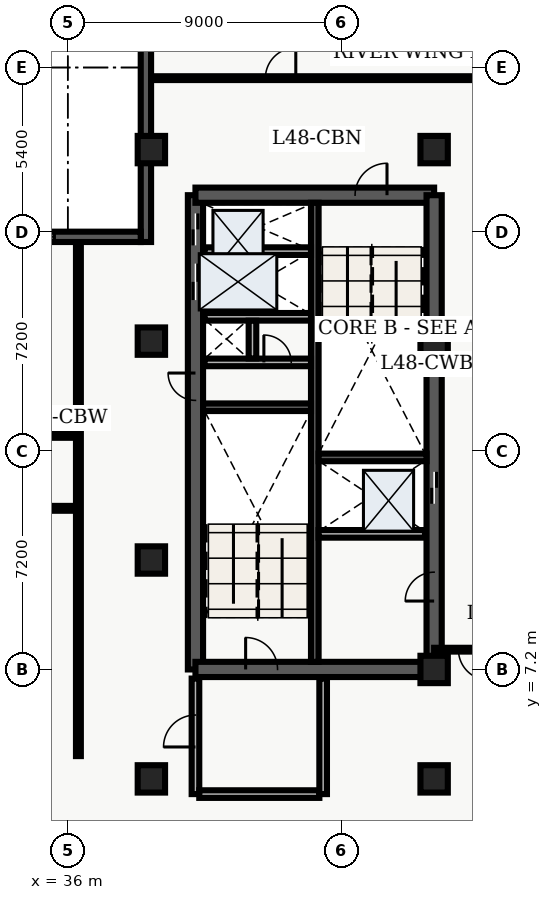
"""IFC4 building model, lengths in metres.
Left out: names, types, materials, properties, quantities, classifications, styles, units other than length and angle.
Written with IfcOpenShell. Run it as: python <this file> out.ifc"""

import sys

from ifc_helpers import new_model, entity, si_unit, converted_unit, direction, frame, origin_with_axes, origin_2d_with_axis, place, context, subcontext, project, spatial, polyline, rectangle, outline, extrude, element, fill, save


model = new_model("IFC4")
c1 = context("Model", 3, precision=1e-05, world=origin_with_axes(), true_north=direction((0.0, 1.0)))
c2 = subcontext(c1, "Body", "Model", "MODEL_VIEW")
j1 = project(units=[si_unit("LENGTHUNIT", "METRE"), converted_unit("PLANEANGLEUNIT", "DEGREE", entity("IfcPlaneAngleMeasure", 0.017), si_unit("PLANEANGLEUNIT", "RADIAN"), dimensions=[0, 0, 0, 0, 0, 0, 0])], contexts=[c1])
p1 = place(None, origin_with_axes())
s1 = spatial("IfcSite", under=j1, at=p1, CompositionType="ELEMENT")
p2 = place(p1, origin_with_axes())
s2 = spatial("IfcBuilding", under=s1, at=p2, CompositionType="ELEMENT")
p3 = place(p2, frame((0.0, 0.0, 196.5), z_axis=(0.0, 0.0, 1.0), x_axis=(1.0, 0.0, 0.0)))
s3 = spatial("IfcBuildingStorey", under=s2, at=p3, CompositionType="ELEMENT", Elevation=196.5)
p4 = place(p3, frame((40.2, 7.2, 0.0), z_axis=(0.0, 0.0, 1.0), x_axis=(0.0, 1.0, 0.0)))
e1 = element("IfcWall", 1, at=p4, inside=s3, PredefinedType="SHEAR", context=c2, shape_type="SweptSolid", body=[
    extrude(outline(polyline([(0.0, -0.25), (15.6, -0.25), (15.6, 0.25), (0.0, 0.25), (0.0, -0.25)])), origin_with_axes(), (0.0, 0.0, 1.0), 3.66),
])
p5 = place(p4, frame((14.475, 0.0, 0.0), z_axis=(0.0, 0.0, 1.0), x_axis=(1.0, 0.0, 0.0)))
e2 = element("IfcOpeningElement", 2, at=p5, cuts=e1, PredefinedType="OPENING", context=c2, shape_type="SweptSolid", body=[
    extrude(rectangle(XDim=1.05, YDim=0.52, at=origin_2d_with_axis()), origin_with_axes(), (0.0, 0.0, 1.0), 2.15),
])
p6 = place(p4, frame((12.75, 0.0, 0.0), z_axis=(0.0, 0.0, 1.0), x_axis=(1.0, 0.0, 0.0)))
e3 = element("IfcOpeningElement", 3, at=p6, cuts=e1, PredefinedType="OPENING", context=c2, shape_type="SweptSolid", body=[
    extrude(rectangle(XDim=1.2, YDim=0.52, at=origin_2d_with_axis()), origin_with_axes(), (0.0, 0.0, 1.0), 2.15),
])
p7 = place(p4, frame((9.3, 0.0, 0.0), z_axis=(0.0, 0.0, 1.0), x_axis=(1.0, 0.0, 0.0)))
e4 = element("IfcOpeningElement", 4, at=p7, cuts=e1, PredefinedType="OPENING", context=c2, shape_type="SweptSolid", body=[
    extrude(rectangle(XDim=0.9, YDim=0.52, at=origin_2d_with_axis()), origin_with_axes(), (0.0, 0.0, 1.0), 2.15),
])
p8 = place(p3, frame((40.2, 7.2, 0.0), z_axis=(0.0, 0.0, 1.0), x_axis=(1.0, 0.0, 0.0)))
e5 = element("IfcWall", 5, at=p8, inside=s3, PredefinedType="SHEAR", context=c2, shape_type="SweptSolid", body=[
    extrude(outline(polyline([(0.0, -0.25), (7.85, -0.25), (7.85, 0.25), (0.0, 0.25), (0.0, -0.25)])), origin_with_axes(), (0.0, 0.0, 1.0), 3.66),
])
p9 = place(p8, frame((2.175, 0.0, 0.0), z_axis=(0.0, 0.0, 1.0), x_axis=(1.0, 0.0, 0.0)))
e6 = element("IfcOpeningElement", 6, at=p9, cuts=e5, PredefinedType="OPENING", context=c2, shape_type="SweptSolid", body=[
    extrude(rectangle(XDim=1.05, YDim=0.52, at=origin_2d_with_axis()), origin_with_axes(), (0.0, 0.0, 1.0), 2.15),
])
p10 = place(p3, frame((40.2, 22.8, 0.0), z_axis=(0.0, 0.0, 1.0), x_axis=(1.0, 0.0, 0.0)))
e7 = element("IfcWall", 7, at=p10, inside=s3, PredefinedType="SHEAR", context=c2, shape_type="SweptSolid", body=[
    extrude(outline(polyline([(0.0, -0.25), (7.85, -0.25), (7.85, 0.25), (0.0, 0.25), (0.0, -0.25)])), origin_with_axes(), (0.0, 0.0, 1.0), 3.66),
])
p11 = place(p10, frame((5.775, 0.0, 0.0), z_axis=(0.0, 0.0, 1.0), x_axis=(1.0, 0.0, 0.0)))
e8 = element("IfcOpeningElement", 8, at=p11, cuts=e7, PredefinedType="OPENING", context=c2, shape_type="SweptSolid", body=[
    extrude(rectangle(XDim=1.05, YDim=0.52, at=origin_2d_with_axis()), origin_with_axes(), (0.0, 0.0, 1.0), 2.15),
])
p12 = place(p3, frame((48.05, 7.2, 0.0), z_axis=(0.0, 0.0, 1.0), x_axis=(0.0, 1.0, 0.0)))
e9 = element("IfcWall", 9, at=p12, inside=s3, PredefinedType="SHEAR", context=c2, shape_type="SweptSolid", body=[
    extrude(outline(polyline([(0.0, -0.25), (15.6, -0.25), (15.6, 0.25), (0.0, 0.25), (0.0, -0.25)])), origin_with_axes(), (0.0, 0.0, 1.0), 3.66),
])
p13 = place(p12, frame((5.975, 0.0, 0.0), z_axis=(0.0, 0.0, 1.0), x_axis=(1.0, 0.0, 0.0)))
e10 = element("IfcOpeningElement", 10, at=p13, cuts=e9, PredefinedType="OPENING", context=c2, shape_type="SweptSolid", body=[
    extrude(rectangle(XDim=1.05, YDim=0.52, at=origin_2d_with_axis()), origin_with_axes(), (0.0, 0.0, 1.0), 2.15),
])
p14 = place(p12, frame((2.725, 0.0, 0.0), z_axis=(0.0, 0.0, 1.0), x_axis=(1.0, 0.0, 0.0)))
e11 = element("IfcOpeningElement", 11, at=p14, cuts=e9, PredefinedType="OPENING", context=c2, shape_type="SweptSolid", body=[
    extrude(rectangle(XDim=0.95, YDim=0.52, at=origin_2d_with_axis()), origin_with_axes(), (0.0, 0.0, 1.0), 2.15),
])
p15 = place(p3, frame((44.125, 7.45, 0.0), z_axis=(0.0, 0.0, 1.0), x_axis=(0.0, 1.0, 0.0)))
e12 = element("IfcWall", 12, at=p15, inside=s3, PredefinedType="SHEAR", context=c2, shape_type="SweptSolid", body=[
    extrude(outline(polyline([(0.0, -0.125), (15.1, -0.125), (15.1, 0.125), (0.0, 0.125), (0.0, -0.125)])), origin_with_axes(), (0.0, 0.0, 1.0), 3.66),
])
for number, where, z_axis, x_axis in (
    (13, (40.45, 15.825, 0.0), (0.0, 0.0, 1.0), (1.0, 0.0, 0.0)),
    (14, (44.25, 14.175, 0.0), (0.0, 0.0, 1.0), (1.0, 0.0, 0.0)),
):
    element("IfcWall", number, at=place(p3, frame(where, z_axis=z_axis, x_axis=x_axis)), inside=s3, PredefinedType="SHEAR", context=c2, shape_type="SweptSolid", body=[
        extrude(outline(polyline([(0.0, -0.125), (3.55, -0.125), (3.55, 0.125), (0.0, 0.125), (0.0, -0.125)])), origin_with_axes(), (0.0, 0.0, 1.0), 3.66),
    ])
p16 = place(p3, frame((40.5, 17.3, 0.0), z_axis=(0.0, 0.0, 1.0), x_axis=(1.0, 0.0, 0.0)))
e15 = element("IfcWall", 15, at=p16, inside=s3, PredefinedType="SOLIDWALL", context=c2, shape_type="SweptSolid", body=[
    extrude(outline(polyline([(0.0, -0.125), (3.5, -0.125), (3.5, 0.125), (0.0, 0.125), (0.0, -0.125)])), origin_with_axes(), (0.0, 0.0, 1.0), 2.7),
])
p17 = place(p16, frame((2.4, 0.0, 0.0), z_axis=(0.0, 0.0, 1.0), x_axis=(1.0, 0.0, 0.0)))
e16 = element("IfcOpeningElement", 16, at=p17, cuts=e15, PredefinedType="OPENING", context=c2, shape_type="SweptSolid", body=[
    extrude(rectangle(XDim=0.9, YDim=0.27, at=origin_2d_with_axis()), origin_with_axes(), (0.0, 0.0, 1.0), 2.15),
])
p18 = place(p3, frame((40.5, 18.8, 0.0), z_axis=(0.0, 0.0, 1.0), x_axis=(1.0, 0.0, 0.0)))
e17 = element("IfcWall", 17, at=p18, inside=s3, PredefinedType="SOLIDWALL", context=c2, shape_type="SweptSolid", body=[
    extrude(outline(polyline([(0.0, -0.125), (3.5, -0.125), (3.5, 0.125), (0.0, 0.125), (0.0, -0.125)])), origin_with_axes(), (0.0, 0.0, 1.0), 2.7),
])
p19 = place(p3, frame((42.075, 17.43, 0.0), z_axis=(0.0, 0.0, 1.0), x_axis=(0.0, 1.0, 0.0)))
e18 = element("IfcWall", 18, at=p19, inside=s3, PredefinedType="SOLIDWALL", context=c2, shape_type="SweptSolid", body=[
    extrude(outline(polyline([(0.0, -0.125), (1.24, -0.125), (1.24, 0.125), (0.0, 0.125), (0.0, -0.125)])), origin_with_axes(), (0.0, 0.0, 1.0), 2.7),
])
p20 = place(p3, frame((40.2, 3.1, 0.0), z_axis=(0.0, 0.0, 1.0), x_axis=(0.0, 1.0, 0.0)))
e19 = element("IfcWall", 19, at=p20, inside=s3, PredefinedType="SOLIDWALL", context=c2, shape_type="SweptSolid", body=[
    extrude(outline(polyline([(0.0, -0.125), (3.8, -0.125), (3.8, 0.125), (0.0, 0.125), (0.0, -0.125)])), origin_with_axes(), (0.0, 0.0, 1.0), 2.7),
])
p21 = place(p20, frame((2.075, 0.0, 0.0), z_axis=(0.0, 0.0, 1.0), x_axis=(1.0, 0.0, 0.0)))
e20 = element("IfcOpeningElement", 20, at=p21, cuts=e19, PredefinedType="OPENING", context=c2, shape_type="SweptSolid", body=[
    extrude(rectangle(XDim=1.05, YDim=0.27, at=origin_2d_with_axis()), origin_with_axes(), (0.0, 0.0, 1.0), 2.15),
])
p22 = place(p3, frame((40.325, 3.1, 0.0), z_axis=(0.0, 0.0, 1.0), x_axis=(1.0, 0.0, 0.0)))
e21 = element("IfcWall", 21, at=p22, inside=s3, PredefinedType="SOLIDWALL", context=c2, shape_type="SweptSolid", body=[
    extrude(outline(polyline([(0.0, -0.125), (3.95, -0.125), (3.95, 0.125), (0.0, 0.125), (0.0, -0.125)])), origin_with_axes(), (0.0, 0.0, 1.0), 2.7),
])
p23 = place(p3, frame((44.4, 3.1, 0.0), z_axis=(0.0, 0.0, 1.0), x_axis=(0.0, 1.0, 0.0)))
e22 = element("IfcWall", 22, at=p23, inside=s3, PredefinedType="SOLIDWALL", context=c2, shape_type="SweptSolid", body=[
    extrude(outline(polyline([(0.0, -0.125), (3.8, -0.125), (3.8, 0.125), (0.0, 0.125), (0.0, -0.125)])), origin_with_axes(), (0.0, 0.0, 1.0), 2.7),
])
for number, where, z_axis, x_axis in (
    (23, (38.75, 3.6, 0.0), (0.0, 0.0, 1.0), (1.0, 0.0, 0.0)),
    (24, (38.75, 10.8, 0.0), (0.0, 0.0, 1.0), (1.0, 0.0, 0.0)),
    (25, (38.75, 18.0, 0.0), (0.0, 0.0, 1.0), (1.0, 0.0, 0.0)),
    (26, (38.75, 24.3, 0.0), (0.0, 0.0, 1.0), (1.0, 0.0, 0.0)),
    (27, (48.05, 3.6, 0.0), (0.0, 0.0, 1.0), (1.0, 0.0, 0.0)),
    (28, (48.05, 7.2, 0.0), (0.0, 0.0, 1.0), (1.0, 0.0, 0.0)),
    (29, (48.05, 18.0, 0.0), (0.0, 0.0, 1.0), (1.0, 0.0, 0.0)),
    (30, (48.05, 24.3, 0.0), (0.0, 0.0, 1.0), (1.0, 0.0, 0.0)),
):
    element("IfcColumn", number, at=place(p3, frame(where, z_axis=z_axis, x_axis=x_axis)), inside=s3, PredefinedType="COLUMN", context=c2, shape_type="SweptSolid", body=[
        extrude(rectangle(XDim=0.9, YDim=0.9, at=origin_2d_with_axis()), origin_with_axes(), (0.0, 0.0, 1.0), 3.9),
    ])
for number, where, z_axis, x_axis in (
    (31, (40.5, 20.96, 0.0), (0.0, 0.0, 1.0), (1.0, 0.0, 0.0)),
    (32, (44.25, 11.66, 0.0), (0.0, 0.0, 1.0), (1.0, 0.0, 0.0)),
):
    element("IfcWall", number, at=place(p3, frame(where, z_axis=z_axis, x_axis=x_axis)), inside=s3, PredefinedType="SOLIDWALL", context=c2, shape_type="SweptSolid", body=[
        extrude(outline(polyline([(0.0, -0.125), (3.5, -0.125), (3.5, 0.125), (0.0, 0.125), (0.0, -0.125)])), origin_with_axes(), (0.0, 0.0, 1.0), 2.7),
    ])
p24 = place(p3, frame((21.15, 12.5, 0.0), z_axis=(0.0, 0.0, 1.0), x_axis=(1.0, 0.0, 0.0)))
e33 = element("IfcWall", 33, at=p24, inside=s3, PredefinedType="PARTITIONING", context=c2, shape_type="SweptSolid", body=[
    extrude(outline(polyline([(0.0, -0.08), (15.2, -0.08), (15.2, 0.08), (0.0, 0.08), (0.0, -0.08)])), origin_with_axes(), (0.0, 0.0, 1.0), 2.7),
])
p25 = place(p24, frame((3.315, 0.0, 0.0), z_axis=(0.0, 0.0, 1.0), x_axis=(1.0, 0.0, 0.0)))
e34 = element("IfcOpeningElement", 34, at=p25, cuts=e33, PredefinedType="OPENING", context=c2, shape_type="SweptSolid", body=[
    extrude(rectangle(XDim=1.0, YDim=0.18, at=origin_2d_with_axis()), origin_with_axes(), (0.0, 0.0, 1.0), 2.15),
])
p26 = place(p24, frame((7.639, 0.0, 0.0), z_axis=(0.0, 0.0, 1.0), x_axis=(1.0, 0.0, 0.0)))
e35 = element("IfcOpeningElement", 35, at=p26, cuts=e33, PredefinedType="OPENING", context=c2, shape_type="SweptSolid", body=[
    extrude(rectangle(XDim=1.0, YDim=0.18, at=origin_2d_with_axis()), origin_with_axes(), (0.0, 0.0, 1.0), 2.15),
])
p27 = place(p24, frame((10.313, 0.0, 0.0), z_axis=(0.0, 0.0, 1.0), x_axis=(1.0, 0.0, 0.0)))
e36 = element("IfcOpeningElement", 36, at=p27, cuts=e33, PredefinedType="OPENING", context=c2, shape_type="SweptSolid", body=[
    extrude(rectangle(XDim=1.0, YDim=0.18, at=origin_2d_with_axis()), origin_with_axes(), (0.0, 0.0, 1.0), 2.15),
])
p28 = place(p24, frame((13.179, 0.0, 0.0), z_axis=(0.0, 0.0, 1.0), x_axis=(1.0, 0.0, 0.0)))
e37 = element("IfcOpeningElement", 37, at=p28, cuts=e33, PredefinedType="OPENING", context=c2, shape_type="SweptSolid", body=[
    extrude(rectangle(XDim=1.0, YDim=0.18, at=origin_2d_with_axis()), origin_with_axes(), (0.0, 0.0, 1.0), 2.15),
])
p29 = place(p3, frame((21.15, 14.9, 0.0), z_axis=(0.0, 0.0, 1.0), x_axis=(1.0, 0.0, 0.0)))
e38 = element("IfcWall", 38, at=p29, inside=s3, PredefinedType="PARTITIONING", context=c2, shape_type="SweptSolid", body=[
    extrude(outline(polyline([(0.0, -0.08), (15.2, -0.08), (15.2, 0.08), (0.0, 0.08), (0.0, -0.08)])), origin_with_axes(), (0.0, 0.0, 1.0), 2.7),
])
p30 = place(p29, frame((7.65, 0.0, 0.0), z_axis=(0.0, 0.0, 1.0), x_axis=(1.0, 0.0, 0.0)))
e39 = element("IfcOpeningElement", 39, at=p30, cuts=e38, PredefinedType="OPENING", context=c2, shape_type="SweptSolid", body=[
    extrude(rectangle(XDim=1.2, YDim=0.18, at=origin_2d_with_axis()), origin_with_axes(), (0.0, 0.0, 1.0), 2.2),
])
p31 = place(p3, frame((36.35, 4.35, 0.0), z_axis=(0.0, 0.0, 1.0), x_axis=(0.0, 1.0, 0.0)))
e40 = element("IfcWall", 40, at=p31, inside=s3, PredefinedType="PARTITIONING", context=c2, shape_type="SweptSolid", body=[
    extrude(outline(polyline([(0.0, -0.08), (16.95, -0.08), (16.95, 0.08), (0.0, 0.08), (0.0, -0.08)])), origin_with_axes(), (0.0, 0.0, 1.0), 2.7),
])
p32 = place(p3, frame((59.665, 7.85, 0.0), z_axis=(0.0, 0.0, 1.0), x_axis=(-1.0, 0.0, 0.0)))
e41 = element("IfcWall", 41, at=p32, inside=s3, PredefinedType="PARTITIONING", context=c2, shape_type="SweptSolid", body=[
    extrude(outline(polyline([(0.0, -0.062), (11.615, -0.062), (11.615, 0.062), (0.0, 0.062), (0.0, -0.062)])), origin_with_axes(), (0.0, 0.0, 1.0), 2.7),
])
p33 = place(p32, frame((10.315, 0.0, 0.0), z_axis=(0.0, 0.0, 1.0), x_axis=(1.0, 0.0, 0.0)))
e42 = element("IfcOpeningElement", 42, at=p33, cuts=e41, PredefinedType="OPENING", context=c2, shape_type="SweptSolid", body=[
    extrude(rectangle(XDim=1.0, YDim=0.145, at=origin_2d_with_axis()), origin_with_axes(), (0.0, 0.0, 1.0), 2.15),
])
p34 = place(p3, frame((38.735, 26.65, 0.0), z_axis=(0.0, 0.0, 1.0), x_axis=(1.0, 0.0, 0.0)))
e43 = element("IfcWall", 43, at=p34, inside=s3, PredefinedType="PARTITIONING", context=c2, shape_type="SweptSolid", body=[
    extrude(outline(polyline([(0.0, -0.062), (20.905, -0.062), (20.905, 0.062), (0.0, 0.062), (0.0, -0.062)])), origin_with_axes(), (0.0, 0.0, 1.0), 2.7),
])
p35 = place(p34, frame((4.265, 0.0, 0.0), z_axis=(0.0, 0.0, 1.0), x_axis=(1.0, 0.0, 0.0)))
e44 = element("IfcOpeningElement", 44, at=p35, cuts=e43, PredefinedType="OPENING", context=c2, shape_type="SweptSolid", body=[
    extrude(rectangle(XDim=1.0, YDim=0.145, at=origin_2d_with_axis()), origin_with_axes(), (0.0, 0.0, 1.0), 2.15),
])
p36 = place(p3, frame((38.57, 21.26, 0.0), z_axis=(0.0, 0.0, 1.0), x_axis=(0.0, 1.0, 0.0)))
e45 = element("IfcWall", 45, at=p36, inside=s3, PredefinedType="SOLIDWALL", context=c2, shape_type="SweptSolid", body=[
    extrude(outline(polyline([(0.0, -0.17), (7.54, -0.17), (7.54, 0.17), (0.0, 0.17), (0.0, -0.17)])), origin_with_axes(), (0.0, 0.0, 1.0), 3.66),
])
p37 = place(p3, frame((28.039, 21.43, 0.0), z_axis=(0.0, 0.0, 1.0), x_axis=(1.0, 0.0, 0.0)))
e46 = element("IfcWall", 46, at=p37, inside=s3, PredefinedType="SOLIDWALL", context=c2, shape_type="SweptSolid", body=[
    extrude(outline(polyline([(0.0, -0.17), (10.361, -0.17), (10.361, 0.17), (0.0, 0.17), (0.0, -0.17)])), origin_with_axes(), (0.0, 0.0, 1.0), 3.66),
])
p38 = place(p37, frame((2.89, 0.0, 0.45), z_axis=(0.0, 0.0, 1.0), x_axis=(1.0, 0.0, 0.0)))
e47 = element("IfcOpeningElement", 47, at=p38, cuts=e46, PredefinedType="OPENING", context=c2, shape_type="SweptSolid", body=[
    extrude(rectangle(XDim=1.8, YDim=0.36, at=origin_2d_with_axis()), origin_with_axes(), (0.0, 0.0, 1.0), 2.1),
])
p39 = place(p37, frame((6.621, 0.0, 0.45), z_axis=(0.0, 0.0, 1.0), x_axis=(1.0, 0.0, 0.0)))
e48 = element("IfcOpeningElement", 48, at=p39, cuts=e46, PredefinedType="OPENING", context=c2, shape_type="SweptSolid", body=[
    extrude(rectangle(XDim=1.8, YDim=0.36, at=origin_2d_with_axis()), origin_with_axes(), (0.0, 0.0, 1.0), 2.1),
])
p40 = place(p12, frame((5.975, 0.0, 0.0), z_axis=(0.0, 0.0, 1.0), x_axis=(1.0, 0.0, 0.0)))
e49 = element("IfcDoor", 49, at=p40, inside=s3, OperationType="SLIDING_TO_LEFT", PredefinedType="DOOR", context=c2, shape_type="SweptSolid", body=[
    extrude(rectangle(XDim=1.05, YDim=0.09, at=origin_2d_with_axis()), origin_with_axes(), (0.0, 0.0, 1.0), 2.15),
])
fill(e10, e49)
p41 = place(p4, frame((14.475, 0.0, 0.0), z_axis=(0.0, 0.0, 1.0), x_axis=(1.0, 0.0, 0.0)))
e50 = element("IfcDoor", 50, at=p41, inside=s3, OperationType="SLIDING_TO_RIGHT", PredefinedType="DOOR", context=c2, shape_type="SweptSolid", body=[
    extrude(rectangle(XDim=1.05, YDim=0.09, at=origin_2d_with_axis()), origin_with_axes(), (0.0, 0.0, 1.0), 2.15),
])
fill(e2, e50)
p42 = place(p4, frame((12.75, 0.0, 0.0), z_axis=(0.0, 0.0, 1.0), x_axis=(1.0, 0.0, 0.0)))
e51 = element("IfcDoor", 51, at=p42, inside=s3, OperationType="DOUBLE_DOOR_SLIDING", PredefinedType="DOOR", context=c2, shape_type="SweptSolid", body=[
    extrude(rectangle(XDim=1.2, YDim=0.09, at=origin_2d_with_axis()), origin_with_axes(), (0.0, 0.0, 1.0), 2.15),
])
fill(e3, e51)
p43 = place(p4, frame((9.3, 0.0, 0.0), z_axis=(0.0, 0.0, 1.0), x_axis=(1.0, 0.0, 0.0)))
e52 = element("IfcDoor", 52, at=p43, inside=s3, OperationType="SINGLE_SWING_RIGHT", PredefinedType="DOOR", context=c2, shape_type="SweptSolid", body=[
    extrude(rectangle(XDim=0.9, YDim=0.09, at=origin_2d_with_axis()), origin_with_axes(), (0.0, 0.0, 1.0), 2.15),
])
fill(e4, e52)
p44 = place(p16, frame((2.4, 0.0, 0.0), z_axis=(0.0, 0.0, 1.0), x_axis=(1.0, 0.0, 0.0)))
e53 = element("IfcDoor", 53, at=p44, inside=s3, OperationType="SINGLE_SWING_LEFT", PredefinedType="DOOR", context=c2, shape_type="SweptSolid", body=[
    extrude(rectangle(XDim=0.9, YDim=0.09, at=origin_2d_with_axis()), origin_with_axes(), (0.0, 0.0, 1.0), 2.15),
])
fill(e16, e53)
p45 = place(p8, frame((2.175, 0.0, 0.0), z_axis=(0.0, 0.0, 1.0), x_axis=(1.0, 0.0, 0.0)))
e54 = element("IfcDoor", 54, at=p45, inside=s3, OperationType="SINGLE_SWING_LEFT", PredefinedType="DOOR", context=c2, shape_type="SweptSolid", body=[
    extrude(rectangle(XDim=1.05, YDim=0.09, at=origin_2d_with_axis()), origin_with_axes(), (0.0, 0.0, 1.0), 2.15),
])
fill(e6, e54)
p46 = place(p10, frame((5.775, 0.0, 0.0), z_axis=(0.0, 0.0, 1.0), x_axis=(1.0, 0.0, 0.0)))
e55 = element("IfcDoor", 55, at=p46, inside=s3, OperationType="SINGLE_SWING_RIGHT", PredefinedType="DOOR", context=c2, shape_type="SweptSolid", body=[
    extrude(rectangle(XDim=1.05, YDim=0.09, at=origin_2d_with_axis()), origin_with_axes(), (0.0, 0.0, 1.0), 2.15),
])
fill(e8, e55)
p47 = place(p20, frame((2.075, 0.0, 0.0), z_axis=(0.0, 0.0, 1.0), x_axis=(1.0, 0.0, 0.0)))
e56 = element("IfcDoor", 56, at=p47, inside=s3, OperationType="SINGLE_SWING_LEFT", PredefinedType="DOOR", context=c2, shape_type="SweptSolid", body=[
    extrude(rectangle(XDim=1.05, YDim=0.09, at=origin_2d_with_axis()), origin_with_axes(), (0.0, 0.0, 1.0), 2.15),
])
fill(e20, e56)
p48 = place(p12, frame((2.725, 0.0, 0.0), z_axis=(0.0, 0.0, 1.0), x_axis=(1.0, 0.0, 0.0)))
e57 = element("IfcDoor", 57, at=p48, inside=s3, OperationType="SINGLE_SWING_LEFT", PredefinedType="DOOR", context=c2, shape_type="SweptSolid", body=[
    extrude(rectangle(XDim=0.95, YDim=0.09, at=origin_2d_with_axis()), origin_with_axes(), (0.0, 0.0, 1.0), 2.15),
])
fill(e11, e57)
p49 = place(p32, frame((10.315, 0.0, 0.0), z_axis=(0.0, 0.0, 1.0), x_axis=(1.0, 0.0, 0.0)))
e58 = element("IfcDoor", 58, at=p49, inside=s3, OperationType="SINGLE_SWING_LEFT", PredefinedType="DOOR", context=c2, shape_type="SweptSolid", body=[
    extrude(rectangle(XDim=1.0, YDim=0.075, at=origin_2d_with_axis()), origin_with_axes(), (0.0, 0.0, 1.0), 2.15),
])
fill(e42, e58)
p50 = place(p34, frame((4.265, 0.0, 0.0), z_axis=(0.0, 0.0, 1.0), x_axis=(1.0, 0.0, 0.0)))
e59 = element("IfcDoor", 59, at=p50, inside=s3, OperationType="SINGLE_SWING_RIGHT", PredefinedType="DOOR", context=c2, shape_type="SweptSolid", body=[
    extrude(rectangle(XDim=1.0, YDim=0.075, at=origin_2d_with_axis()), origin_with_axes(), (0.0, 0.0, 1.0), 2.15),
])
fill(e44, e59)
p51 = place(p37, frame((6.621, 0.0, 0.45), z_axis=(0.0, 0.0, 1.0), x_axis=(1.0, 0.0, 0.0)))
e60 = element("IfcWindow", 60, at=p51, inside=s3, PredefinedType="WINDOW", context=c2, shape_type="SweptSolid", body=[
    extrude(rectangle(XDim=1.8, YDim=0.09, at=origin_2d_with_axis()), origin_with_axes(), (0.0, 0.0, 1.0), 2.1),
])
fill(e48, e60)
save(model, sys.argv[1])
